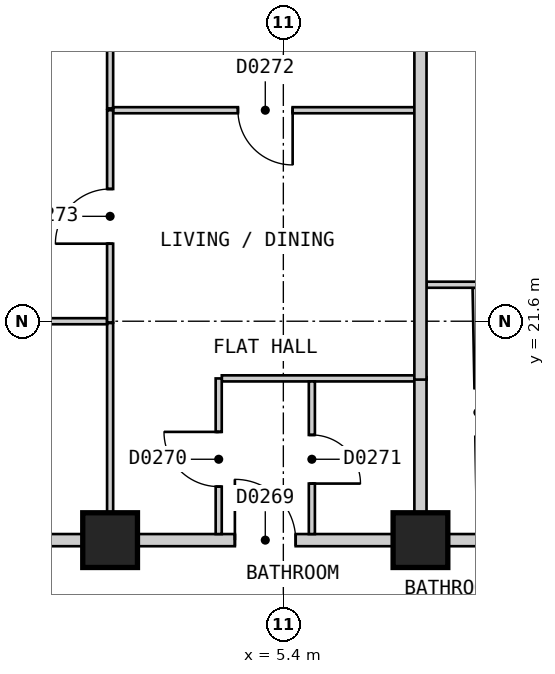
"""IFC4 building model, lengths in metres.
Left out: names, types, materials, properties, quantities, classifications, styles, units other than length and angle.
Written with IfcOpenShell. Run it as: python <this file> out.ifc"""

import sys

from ifc_helpers import new_model, si_unit, direction, frame, frame_2d, origin, origin_2d, place, context, subcontext, project, spatial, rectangle, extrude, element, fill, save


model = new_model("IFC4")
c1 = context("Model", 3, precision=1e-05, world=origin(), true_north=direction((0.0, 1.0)))
c2 = subcontext(c1, "Body", "Model", "MODEL_VIEW")
j1 = project(units=[si_unit("LENGTHUNIT", "METRE"), si_unit("PLANEANGLEUNIT", "RADIAN")], contexts=[c1])
p1 = place(None, origin())
s1 = spatial("IfcSite", under=j1, at=p1, CompositionType="ELEMENT")
p2 = place(p1, origin())
s2 = spatial("IfcBuilding", under=s1, at=p2, CompositionType="ELEMENT")
p3 = place(p2, frame((0.0, 0.0, 41.4)))
s3 = spatial("IfcBuildingStorey", under=s2, at=p3, CompositionType="ELEMENT", Elevation=41.4)
for number, where, z_axis, x_axis in (
    (1, (7.655, 18.0, 0.0), (0.0, 0.0, 1.0), (-1.0, 0.0, 0.0)),
    (2, (2.551, 18.0, 0.0), (0.0, 0.0, 1.0), (-1.0, 0.0, 0.0)),
):
    element("IfcColumn", number, at=place(p3, frame(where, z_axis=z_axis, x_axis=x_axis)), inside=s3, PredefinedType="COLUMN", context=c2, shape_type="SweptSolid", body=[
        extrude(rectangle(XDim=0.9, YDim=0.9, at=origin_2d()), origin(), (0.0, 0.0, 1.0), 3.0),
    ])
p4 = place(p3, frame((-10.276, 18.0, 0.0), z_axis=(0.0, 0.0, 1.0), x_axis=(1.0, 0.0, 0.0)))
e3 = element("IfcWall", 3, at=p4, inside=s3, PredefinedType="PARTITIONING", context=c2, shape_type="SweptSolid", body=[
    extrude(rectangle(XDim=20.558, YDim=0.2, at=frame_2d((10.279, 0.0))), origin(), (0.0, 0.0, 1.0), 2.7),
])
p5 = place(p4, frame((19.265, 0.0, 0.0)))
e4 = element("IfcOpeningElement", 4, at=p5, cuts=e3, PredefinedType="OPENING", context=c2, shape_type="SweptSolid", body=[
    extrude(rectangle(XDim=1.0, YDim=2.1, at=frame_2d((0.5, 1.05))), frame((0.0, 0.11, 0.0), z_axis=(0.0, -1.0, 0.0), x_axis=(1.0, 0.0, 0.0)), (0.0, 0.0, 1.0), 0.22),
])
p6 = place(p4, frame((14.879, 0.0, 0.0)))
e5 = element("IfcOpeningElement", 5, at=p6, cuts=e3, PredefinedType="OPENING", context=c2, shape_type="SweptSolid", body=[
    extrude(rectangle(XDim=1.0, YDim=2.1, at=frame_2d((0.5, 1.05))), frame((0.0, 0.11, 0.0), z_axis=(0.0, -1.0, 0.0), x_axis=(1.0, 0.0, 0.0)), (0.0, 0.0, 1.0), 0.22),
])
p7 = place(p4, frame((4.671, 0.0, 0.0)))
e6 = element("IfcOpeningElement", 6, at=p7, cuts=e3, PredefinedType="OPENING", context=c2, shape_type="SweptSolid", body=[
    extrude(rectangle(XDim=1.0, YDim=2.1, at=frame_2d((0.5, 1.05))), frame((0.0, 0.11, 0.0), z_axis=(0.0, -1.0, 0.0), x_axis=(1.0, 0.0, 0.0)), (0.0, 0.0, 1.0), 0.22),
])
p8 = place(p3, frame((8.562, 22.15, 0.0), z_axis=(0.0, 0.0, 1.0), x_axis=(0.018504185939, -0.999828782894, 0.0)))
e7 = element("IfcWall", 7, at=p8, inside=s3, PredefinedType="PARTITIONING", context=c2, shape_type="SweptSolid", body=[
    extrude(rectangle(XDim=4.051, YDim=0.1, at=frame_2d((2.025, 0.0))), origin(), (0.0, 0.0, 1.0), 2.7),
])
p9 = place(p8, frame((1.65, 0.0, 0.0)))
e8 = element("IfcOpeningElement", 8, at=p9, cuts=e7, PredefinedType="OPENING", context=c2, shape_type="SweptSolid", body=[
    extrude(rectangle(XDim=0.8, YDim=2.1, at=frame_2d((0.4, 1.05))), frame((0.0, 0.06, 0.0), z_axis=(0.0, -1.0, 0.0), x_axis=(1.0, 0.0, 0.0)), (0.0, 0.0, 1.0), 0.12),
])
p10 = place(p3, frame((2.551, 28.1, 0.0), z_axis=(0.0, 0.0, 1.0), x_axis=(0.0, -1.0, 0.0)))
e9 = element("IfcWall", 9, at=p10, inside=s3, PredefinedType="PARTITIONING", context=c2, shape_type="SweptSolid", body=[
    extrude(rectangle(XDim=3.0, YDim=0.1, at=frame_2d((1.5, 0.0))), origin(), (0.0, 0.0, 1.0), 2.7),
])
p11 = place(p3, frame((2.551, 21.57, 0.0), z_axis=(0.0, 0.0, 1.0), x_axis=(0.0, -1.0, 0.0)))
e10 = element("IfcWall", 10, at=p11, inside=s3, PredefinedType="PARTITIONING", context=c2, shape_type="SweptSolid", body=[
    extrude(rectangle(XDim=3.47, YDim=0.1, at=frame_2d((1.735, 0.0))), origin(), (0.0, 0.0, 1.0), 2.7),
])
p12 = place(p3, frame((4.388, 20.66, 0.0), z_axis=(0.0, 0.0, 1.0), x_axis=(1.0, 0.0, 0.0)))
e11 = element("IfcWall", 11, at=p12, inside=s3, PredefinedType="PARTITIONING", context=c2, shape_type="SweptSolid", body=[
    extrude(rectangle(XDim=3.167, YDim=0.1, at=frame_2d((1.583, 0.0))), origin(), (0.0, 0.0, 1.0), 2.7),
])
p13 = place(p3, frame((-2.453, 21.6, 0.0), z_axis=(0.0, 0.0, 1.0), x_axis=(1.0, 0.0, 0.0)))
e12 = element("IfcWall", 12, at=p13, inside=s3, PredefinedType="PARTITIONING", context=c2, shape_type="SweptSolid", body=[
    extrude(rectangle(XDim=4.954, YDim=0.1, at=frame_2d((2.477, 0.0))), origin(), (0.0, 0.0, 1.0), 2.7),
])
p14 = place(p13, frame((2.052, 0.0, 0.0)))
e13 = element("IfcOpeningElement", 13, at=p14, cuts=e12, PredefinedType="OPENING", context=c2, shape_type="SweptSolid", body=[
    extrude(rectangle(XDim=0.8, YDim=2.1, at=frame_2d((0.4, 1.05))), frame((0.0, 0.06, 0.0), z_axis=(0.0, -1.0, 0.0), x_axis=(1.0, 0.0, 0.0)), (0.0, 0.0, 1.0), 0.12),
])
p15 = place(p3, frame((7.755, 22.2, 0.0), z_axis=(0.0, 0.0, 1.0), x_axis=(1.0, 0.0, 0.0)))
e14 = element("IfcWall", 14, at=p15, inside=s3, PredefinedType="PARTITIONING", context=c2, shape_type="SweptSolid", body=[
    extrude(rectangle(XDim=5.005, YDim=0.1, at=frame_2d((2.502, 0.0))), origin(), (0.0, 0.0, 1.0), 2.7),
])
p16 = place(p15, frame((1.206, 0.0, 0.0)))
e15 = element("IfcOpeningElement", 15, at=p16, cuts=e14, PredefinedType="OPENING", context=c2, shape_type="SweptSolid", body=[
    extrude(rectangle(XDim=0.9, YDim=2.1, at=frame_2d((0.45, 1.05))), frame((0.0, 0.06, 0.0), z_axis=(0.0, -1.0, 0.0), x_axis=(1.0, 0.0, 0.0)), (0.0, 0.0, 1.0), 0.12),
])
p17 = place(p3, frame((2.601, 25.07, 0.0), z_axis=(0.0, 0.0, 1.0), x_axis=(1.0, 0.0, 0.0)))
e16 = element("IfcWall", 16, at=p17, inside=s3, PredefinedType="PARTITIONING", context=c2, shape_type="SweptSolid", body=[
    extrude(rectangle(XDim=4.954, YDim=0.1, at=frame_2d((2.477, 0.0))), origin(), (0.0, 0.0, 1.0), 2.7),
])
p18 = place(p17, frame((2.052, 0.0, 0.0)))
e17 = element("IfcOpeningElement", 17, at=p18, cuts=e16, PredefinedType="OPENING", context=c2, shape_type="SweptSolid", body=[
    extrude(rectangle(XDim=0.9, YDim=2.1, at=frame_2d((0.45, 1.05))), frame((0.0, 0.06, 0.0), z_axis=(0.0, -1.0, 0.0), x_axis=(1.0, 0.0, 0.0)), (0.0, 0.0, 1.0), 0.12),
])
p19 = place(p3, frame((4.337, 18.1, 0.0), z_axis=(0.0, 0.0, 1.0), x_axis=(0.0, 1.0, 0.0)))
e18 = element("IfcWall", 18, at=p19, inside=s3, PredefinedType="PARTITIONING", context=c2, shape_type="SweptSolid", body=[
    extrude(rectangle(XDim=2.559, YDim=0.1, at=frame_2d((1.279, 0.0))), origin(), (0.0, 0.0, 1.0), 2.7),
])
p20 = place(p19, frame((0.78, 0.0, 0.0)))
e19 = element("IfcOpeningElement", 19, at=p20, cuts=e18, PredefinedType="OPENING", context=c2, shape_type="SweptSolid", body=[
    extrude(rectangle(XDim=0.9, YDim=2.1, at=frame_2d((0.45, 1.05))), frame((0.0, 0.06, 0.0), z_axis=(0.0, -1.0, 0.0), x_axis=(1.0, 0.0, 0.0)), (0.0, 0.0, 1.0), 0.12),
])
p21 = place(p3, frame((5.869, 18.1, 0.0), z_axis=(0.0, 0.0, 1.0), x_axis=(0.0, 1.0, 0.0)))
e20 = element("IfcWall", 20, at=p21, inside=s3, PredefinedType="PARTITIONING", context=c2, shape_type="SweptSolid", body=[
    extrude(rectangle(XDim=2.51, YDim=0.1, at=frame_2d((1.255, 0.0))), origin(), (0.0, 0.0, 1.0), 2.7),
])
p22 = place(p21, frame((0.83, 0.0, 0.0)))
e21 = element("IfcOpeningElement", 21, at=p22, cuts=e20, PredefinedType="OPENING", context=c2, shape_type="SweptSolid", body=[
    extrude(rectangle(XDim=0.8, YDim=2.1, at=frame_2d((0.4, 1.05))), frame((0.0, 0.06, 0.0), z_axis=(0.0, -1.0, 0.0), x_axis=(1.0, 0.0, 0.0)), (0.0, 0.0, 1.0), 0.12),
])
p23 = place(p3, frame((2.551, 21.58, 0.0), z_axis=(0.0, 0.0, 1.0), x_axis=(0.0, 1.0, 0.0)))
e22 = element("IfcWall", 22, at=p23, inside=s3, PredefinedType="PARTITIONING", context=c2, shape_type="SweptSolid", body=[
    extrude(rectangle(XDim=3.49, YDim=0.1, at=frame_2d((1.745, 0.0))), origin(), (0.0, 0.0, 1.0), 2.7),
])
p24 = place(p23, frame((1.295, 0.0, 0.0)))
e23 = element("IfcOpeningElement", 23, at=p24, cuts=e22, PredefinedType="OPENING", context=c2, shape_type="SweptSolid", body=[
    extrude(rectangle(XDim=0.9, YDim=2.1, at=frame_2d((0.45, 1.05))), frame((0.0, 0.06, 0.0), z_axis=(0.0, -1.0, 0.0), x_axis=(1.0, 0.0, 0.0)), (0.0, 0.0, 1.0), 0.12),
])
p25 = place(p3, frame((7.655, 20.68, 0.0), z_axis=(0.0, 0.0, 1.0), x_axis=(0.0, -1.0, 0.0)))
e24 = element("IfcWall", 24, at=p25, inside=s3, PredefinedType="PARTITIONING", context=c2, shape_type="SweptSolid", body=[
    extrude(rectangle(XDim=2.58, YDim=0.2, at=frame_2d((1.29, 0.0))), origin(), (0.0, 0.0, 1.0), 2.7),
])
p26 = place(p3, frame((7.655, 20.64, 0.0), z_axis=(0.0, 0.0, 1.0), x_axis=(0.0, 1.0, 0.0)))
e25 = element("IfcWall", 25, at=p26, inside=s3, PredefinedType="PARTITIONING", context=c2, shape_type="SweptSolid", body=[
    extrude(rectangle(XDim=7.46, YDim=0.2, at=frame_2d((3.73, 0.0))), origin(), (0.0, 0.0, 1.0), 2.7),
])
p27 = place(p6, origin())
e26 = element("IfcDoor", 26, at=p27, inside=s3, OperationType="SINGLE_SWING_LEFT", PredefinedType="DOOR", context=c2, shape_type="SweptSolid", body=[
    extrude(rectangle(XDim=1.0, YDim=2.1, at=frame_2d((0.5, 1.05))), frame((0.0, 0.025, 0.0), z_axis=(0.0, -1.0, 0.0), x_axis=(1.0, 0.0, 0.0)), (0.0, 0.0, 1.0), 0.05),
])
fill(e5, e26)
p28 = place(p20, origin())
e27 = element("IfcDoor", 27, at=p28, inside=s3, OperationType="SINGLE_SWING_RIGHT", PredefinedType="DOOR", context=c2, shape_type="SweptSolid", body=[
    extrude(rectangle(XDim=0.9, YDim=2.1, at=frame_2d((0.45, 1.05))), frame((0.0, 0.025, 0.0), z_axis=(0.0, -1.0, 0.0), x_axis=(1.0, 0.0, 0.0)), (0.0, 0.0, 1.0), 0.05),
])
fill(e19, e27)
p29 = place(p22, origin())
e28 = element("IfcDoor", 28, at=p29, inside=s3, OperationType="SINGLE_SWING_LEFT", PredefinedType="DOOR", context=c2, shape_type="SweptSolid", body=[
    extrude(rectangle(XDim=0.8, YDim=2.1, at=frame_2d((0.4, 1.05))), frame((0.0, 0.025, 0.0), z_axis=(0.0, -1.0, 0.0), x_axis=(1.0, 0.0, 0.0)), (0.0, 0.0, 1.0), 0.05),
])
fill(e21, e28)
p30 = place(p18, origin())
e29 = element("IfcDoor", 29, at=p30, inside=s3, OperationType="SINGLE_SWING_RIGHT", PredefinedType="DOOR", context=c2, shape_type="SweptSolid", body=[
    extrude(rectangle(XDim=0.9, YDim=2.1, at=frame_2d((0.45, 1.05))), frame((0.0, 0.025, 0.0), z_axis=(0.0, -1.0, 0.0), x_axis=(1.0, 0.0, 0.0)), (0.0, 0.0, 1.0), 0.05),
])
fill(e17, e29)
p31 = place(p24, origin())
e30 = element("IfcDoor", 30, at=p31, inside=s3, OperationType="SINGLE_SWING_LEFT", PredefinedType="DOOR", context=c2, shape_type="SweptSolid", body=[
    extrude(rectangle(XDim=0.9, YDim=2.1, at=frame_2d((0.45, 1.05))), frame((0.0, 0.025, 0.0), z_axis=(0.0, -1.0, 0.0), x_axis=(1.0, 0.0, 0.0)), (0.0, 0.0, 1.0), 0.05),
])
fill(e23, e30)
save(model, sys.argv[1])
